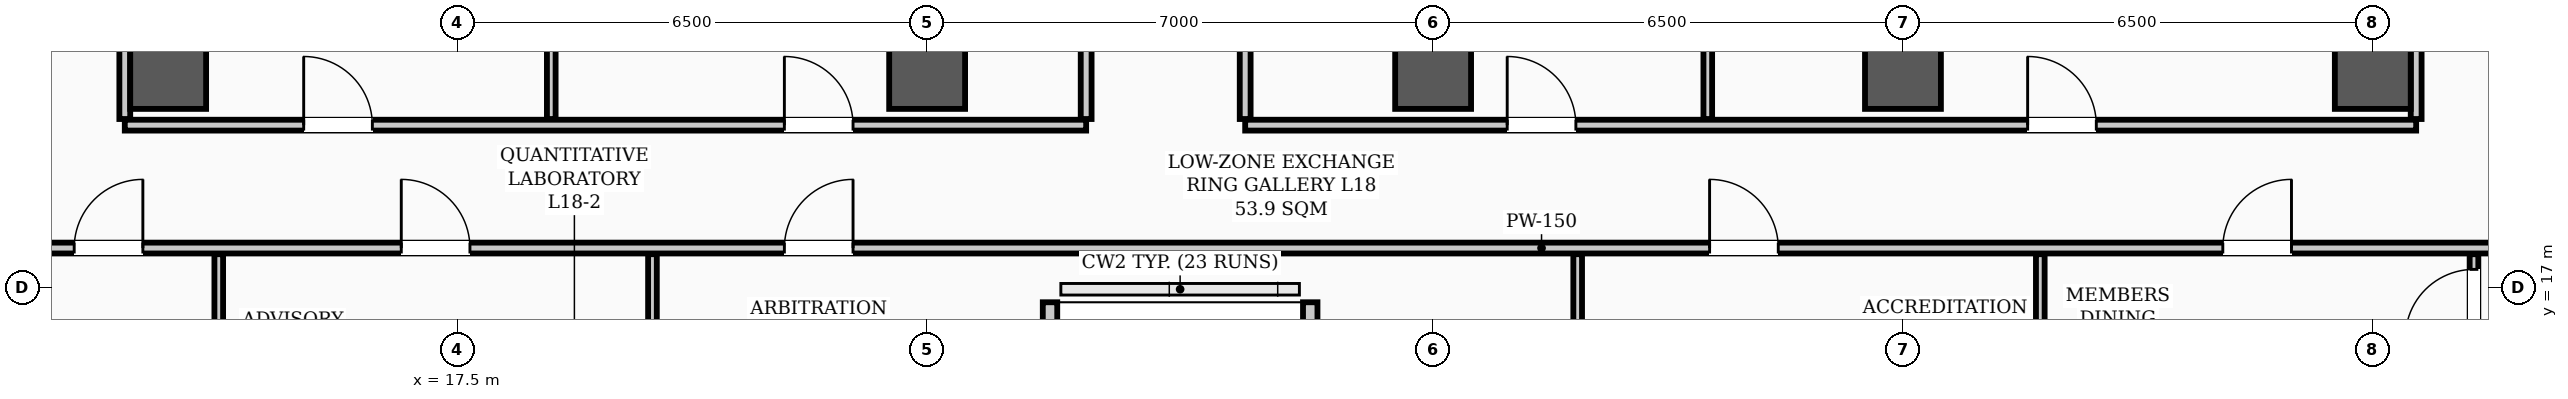
"""IFC4 building model, lengths in metres.
Left out: names, types, materials, properties, quantities, classifications, styles, units other than length and angle.
Written with IfcOpenShell. Run it as: python <this file> out.ifc"""

import sys

from ifc_helpers import new_model, si_unit, direction, frame, frame_2d, origin, origin_2d, place, context, subcontext, project, spatial, rectangle, hollow_rectangle, extrude, element, fill, save


model = new_model("IFC4")
c1 = context("Model", 3, precision=1e-05, world=origin(), true_north=direction((0.0, 1.0)))
c2 = subcontext(c1, "Body", "Model", "MODEL_VIEW")
j1 = project(units=[si_unit("LENGTHUNIT", "METRE"), si_unit("PLANEANGLEUNIT", "RADIAN")], contexts=[c1])
p1 = place(None, origin())
s1 = spatial("IfcSite", under=j1, at=p1, CompositionType="ELEMENT")
p2 = place(p1, origin())
s2 = spatial("IfcBuilding", under=s1, at=p2, CompositionType="ELEMENT")
p3 = place(p2, frame((0.0, 0.0, 73.3)))
s3 = spatial("IfcBuildingStorey", under=s2, at=p3, CompositionType="ELEMENT", Elevation=73.3)
for number, where, z_axis, x_axis in (
    (1, (13.5, 20.0, 0.0), (0.0, 0.0, 1.0), (1.0, 0.0, 0.0)),
    (2, (24.0, 20.0, 0.0), (0.0, 0.0, 1.0), (1.0, 0.0, 0.0)),
    (3, (31.0, 20.0, 0.0), (0.0, 0.0, 1.0), (1.0, 0.0, 0.0)),
    (4, (37.5, 20.0, 0.0), (0.0, 0.0, 1.0), (1.0, 0.0, 0.0)),
    (5, (44.0, 20.0, 0.0), (0.0, 0.0, 1.0), (1.0, 0.0, 0.0)),
):
    element("IfcColumn", number, at=place(p3, frame(where, z_axis=z_axis, x_axis=x_axis)), inside=s3, PredefinedType="COLUMN", context=c2, shape_type="SweptSolid", body=[
        extrude(hollow_rectangle(XDim=1.05, YDim=1.05, WallThickness=0.038, InnerFilletRadius=0.019, OuterFilletRadius=0.057, at=origin_2d()), origin(), (0.0, 0.0, 1.0), 3.9),
    ])
for number, where, z_axis, x_axis in (
    (6, (25.7, 15.1, 0.0), (0.0, 0.0, 1.0), (0.0, 1.0, 0.0)),
    (7, (29.3, 16.8, 0.0), (0.0, 0.0, 1.0), (0.0, -1.0, 0.0)),
):
    element("IfcWall", number, at=place(p3, frame(where, z_axis=z_axis, x_axis=x_axis)), inside=s3, PredefinedType="PARAPET", context=c2, shape_type="SweptSolid", body=[
        extrude(rectangle(XDim=1.7, YDim=0.2, at=frame_2d((0.85, 0.0))), origin(), (0.0, 0.0, 1.0), 1.2),
    ])
p4 = place(p3, frame((10.16, 17.55, 0.0), z_axis=(0.0, 0.0, 1.0), x_axis=(1.0, 0.0, 0.0)))
e8 = element("IfcWall", 8, at=p4, inside=s3, PredefinedType="PARTITIONING", context=c2, shape_type="SweptSolid", body=[
    extrude(rectangle(XDim=44.68, YDim=0.15, at=frame_2d((22.34, 0.0))), origin(), (0.0, 0.0, 1.0), 3.1),
])
p5 = place(p4, frame((2.04, 0.0, 0.0)))
e9 = element("IfcOpeningElement", 9, at=p5, cuts=e8, PredefinedType="OPENING", context=c2, shape_type="SweptSolid", body=[
    extrude(rectangle(XDim=0.95, YDim=2.08, at=frame_2d((0.475, 1.04))), frame((0.0, 0.085, 0.0), z_axis=(0.0, -1.0, 0.0), x_axis=(1.0, 0.0, 0.0)), (0.0, 0.0, 1.0), 0.17),
])
p6 = place(p4, frame((6.565, 0.0, 0.0)))
e10 = element("IfcOpeningElement", 10, at=p6, cuts=e8, PredefinedType="OPENING", context=c2, shape_type="SweptSolid", body=[
    extrude(rectangle(XDim=0.95, YDim=2.08, at=frame_2d((0.475, 1.04))), frame((0.0, 0.085, 0.0), z_axis=(0.0, -1.0, 0.0), x_axis=(1.0, 0.0, 0.0)), (0.0, 0.0, 1.0), 0.17),
])
p7 = place(p4, frame((11.865, 0.0, 0.0)))
e11 = element("IfcOpeningElement", 11, at=p7, cuts=e8, PredefinedType="OPENING", context=c2, shape_type="SweptSolid", body=[
    extrude(rectangle(XDim=0.95, YDim=2.08, at=frame_2d((0.475, 1.04))), frame((0.0, 0.085, 0.0), z_axis=(0.0, -1.0, 0.0), x_axis=(1.0, 0.0, 0.0)), (0.0, 0.0, 1.0), 0.17),
])
p8 = place(p4, frame((24.665, 0.0, 0.0)))
e12 = element("IfcOpeningElement", 12, at=p8, cuts=e8, PredefinedType="OPENING", context=c2, shape_type="SweptSolid", body=[
    extrude(rectangle(XDim=0.95, YDim=2.08, at=frame_2d((0.475, 1.04))), frame((0.0, 0.085, 0.0), z_axis=(0.0, -1.0, 0.0), x_axis=(1.0, 0.0, 0.0)), (0.0, 0.0, 1.0), 0.17),
])
p9 = place(p4, frame((31.765, 0.0, 0.0)))
e13 = element("IfcOpeningElement", 13, at=p9, cuts=e8, PredefinedType="OPENING", context=c2, shape_type="SweptSolid", body=[
    extrude(rectangle(XDim=0.95, YDim=2.08, at=frame_2d((0.475, 1.04))), frame((0.0, 0.085, 0.0), z_axis=(0.0, -1.0, 0.0), x_axis=(1.0, 0.0, 0.0)), (0.0, 0.0, 1.0), 0.17),
])
p10 = place(p3, frame((12.9, 19.25, 0.0), z_axis=(0.0, 0.0, 1.0), x_axis=(1.0, 0.0, 0.0)))
e14 = element("IfcWall", 14, at=p10, inside=s3, PredefinedType="PARTITIONING", context=c2, shape_type="SweptSolid", body=[
    extrude(rectangle(XDim=13.3, YDim=0.15, at=frame_2d((6.65, 0.0))), origin(), (0.0, 0.0, 1.0), 3.1),
])
p11 = place(p10, frame((2.475, 0.0, 0.0)))
e15 = element("IfcOpeningElement", 15, at=p11, cuts=e14, PredefinedType="OPENING", context=c2, shape_type="SweptSolid", body=[
    extrude(rectangle(XDim=0.95, YDim=2.08, at=frame_2d((0.475, 1.04))), frame((0.0, 0.085, 0.0), z_axis=(0.0, -1.0, 0.0), x_axis=(1.0, 0.0, 0.0)), (0.0, 0.0, 1.0), 0.17),
])
p12 = place(p10, frame((9.125, 0.0, 0.0)))
e16 = element("IfcOpeningElement", 16, at=p12, cuts=e14, PredefinedType="OPENING", context=c2, shape_type="SweptSolid", body=[
    extrude(rectangle(XDim=0.95, YDim=2.08, at=frame_2d((0.475, 1.04))), frame((0.0, 0.085, 0.0), z_axis=(0.0, -1.0, 0.0), x_axis=(1.0, 0.0, 0.0)), (0.0, 0.0, 1.0), 0.17),
])
p13 = place(p3, frame((28.4, 19.25, 0.0), z_axis=(0.0, 0.0, 1.0), x_axis=(1.0, 0.0, 0.0)))
e17 = element("IfcWall", 17, at=p13, inside=s3, PredefinedType="PARTITIONING", context=c2, shape_type="SweptSolid", body=[
    extrude(rectangle(XDim=16.2, YDim=0.15, at=frame_2d((8.1, 0.0))), origin(), (0.0, 0.0, 1.0), 3.1),
])
p14 = place(p13, frame((3.625, 0.0, 0.0)))
e18 = element("IfcOpeningElement", 18, at=p14, cuts=e17, PredefinedType="OPENING", context=c2, shape_type="SweptSolid", body=[
    extrude(rectangle(XDim=0.95, YDim=2.08, at=frame_2d((0.475, 1.04))), frame((0.0, 0.085, 0.0), z_axis=(0.0, -1.0, 0.0), x_axis=(1.0, 0.0, 0.0)), (0.0, 0.0, 1.0), 0.17),
])
p15 = place(p13, frame((10.825, 0.0, 0.0)))
e19 = element("IfcOpeningElement", 19, at=p15, cuts=e17, PredefinedType="OPENING", context=c2, shape_type="SweptSolid", body=[
    extrude(rectangle(XDim=0.95, YDim=2.08, at=frame_2d((0.475, 1.04))), frame((0.0, 0.085, 0.0), z_axis=(0.0, -1.0, 0.0), x_axis=(1.0, 0.0, 0.0)), (0.0, 0.0, 1.0), 0.17),
])
for number, where, z_axis, x_axis in (
    (20, (26.2, 19.335, 0.0), (0.0, 0.0, 1.0), (0.0, 1.0, 0.0)),
    (21, (28.4, 19.335, 0.0), (0.0, 0.0, 1.0), (0.0, 1.0, 0.0)),
    (22, (12.9, 19.335, 0.0), (0.0, 0.0, 1.0), (0.0, 1.0, 0.0)),
    (23, (44.6, 19.335, 0.0), (0.0, 0.0, 1.0), (0.0, 1.0, 0.0)),
):
    element("IfcWall", number, at=place(p3, frame(where, z_axis=z_axis, x_axis=x_axis)), inside=s3, PredefinedType="PARTITIONING", context=c2, shape_type="SweptSolid", body=[
        extrude(rectangle(XDim=7.38, YDim=0.15, at=frame_2d((3.69, 0.0))), origin(), (0.0, 0.0, 1.0), 3.0),
    ])
for number, where, z_axis, x_axis in (
    (24, (14.2, 15.31, 0.0), (0.0, 0.0, 1.0), (0.0, 1.0, 0.0)),
    (25, (20.2, 15.31, 0.0), (0.0, 0.0, 1.0), (0.0, 1.0, 0.0)),
    (26, (33.0, 15.31, 0.0), (0.0, 0.0, 1.0), (0.0, 1.0, 0.0)),
    (27, (39.4, 15.31, 0.0), (0.0, 0.0, 1.0), (0.0, 1.0, 0.0)),
):
    element("IfcWall", number, at=place(p3, frame(where, z_axis=z_axis, x_axis=x_axis)), inside=s3, PredefinedType="PARTITIONING", context=c2, shape_type="SweptSolid", body=[
        extrude(rectangle(XDim=2.155, YDim=0.12, at=frame_2d((1.078, 0.0))), origin(), (0.0, 0.0, 1.0), 3.212),
    ])
p16 = place(p3, frame((45.4, 15.31, 0.0), z_axis=(0.0, 0.0, 1.0), x_axis=(0.0, 1.0, 0.0)))
e28 = element("IfcWall", 28, at=p16, inside=s3, PredefinedType="PARTITIONING", context=c2, shape_type="SweptSolid", body=[
    extrude(rectangle(XDim=2.155, YDim=0.12, at=frame_2d((1.078, 0.0))), origin(), (0.0, 0.0, 1.0), 3.72),
])
p17 = place(p16, frame((0.995, 0.0, 0.0)))
e29 = element("IfcOpeningElement", 29, at=p17, cuts=e28, PredefinedType="OPENING", context=c2, shape_type="SweptSolid", body=[
    extrude(rectangle(XDim=0.95, YDim=2.08, at=frame_2d((0.475, 1.04))), frame((0.0, 0.07, 0.0), z_axis=(0.0, -1.0, 0.0), x_axis=(1.0, 0.0, 0.0)), (0.0, 0.0, 1.0), 0.14),
])
for number, where, z_axis, x_axis in (
    (30, (18.8, 19.335, 0.0), (0.0, 0.0, 1.0), (0.0, 1.0, 0.0)),
    (31, (34.8, 19.335, 0.0), (0.0, 0.0, 1.0), (0.0, 1.0, 0.0)),
):
    element("IfcWall", number, at=place(p3, frame(where, z_axis=z_axis, x_axis=x_axis)), inside=s3, PredefinedType="PARTITIONING", context=c2, shape_type="SweptSolid", body=[
        extrude(rectangle(XDim=7.38, YDim=0.12, at=frame_2d((3.69, 0.0))), origin(), (0.0, 0.0, 1.0), 3.0),
    ])
p18 = place(p5, origin())
e32 = element("IfcDoor", 32, at=p18, inside=s3, OperationType="SINGLE_SWING_RIGHT", PredefinedType="DOOR", context=c2, shape_type="SweptSolid", body=[
    extrude(rectangle(XDim=0.95, YDim=2.08, at=frame_2d((0.475, 1.04))), frame((0.0, 0.025, 0.0), z_axis=(0.0, -1.0, 0.0), x_axis=(1.0, 0.0, 0.0)), (0.0, 0.0, 1.0), 0.05),
])
fill(e9, e32)
p19 = place(p6, origin())
e33 = element("IfcDoor", 33, at=p19, inside=s3, OperationType="SINGLE_SWING_LEFT", PredefinedType="DOOR", context=c2, shape_type="SweptSolid", body=[
    extrude(rectangle(XDim=0.95, YDim=2.08, at=frame_2d((0.475, 1.04))), frame((0.0, 0.025, 0.0), z_axis=(0.0, -1.0, 0.0), x_axis=(1.0, 0.0, 0.0)), (0.0, 0.0, 1.0), 0.05),
])
fill(e10, e33)
p20 = place(p7, origin())
e34 = element("IfcDoor", 34, at=p20, inside=s3, OperationType="SINGLE_SWING_RIGHT", PredefinedType="DOOR", context=c2, shape_type="SweptSolid", body=[
    extrude(rectangle(XDim=0.95, YDim=2.08, at=frame_2d((0.475, 1.04))), frame((0.0, 0.025, 0.0), z_axis=(0.0, -1.0, 0.0), x_axis=(1.0, 0.0, 0.0)), (0.0, 0.0, 1.0), 0.05),
])
fill(e11, e34)
p21 = place(p8, origin())
e35 = element("IfcDoor", 35, at=p21, inside=s3, OperationType="SINGLE_SWING_LEFT", PredefinedType="DOOR", context=c2, shape_type="SweptSolid", body=[
    extrude(rectangle(XDim=0.95, YDim=2.08, at=frame_2d((0.475, 1.04))), frame((0.0, 0.025, 0.0), z_axis=(0.0, -1.0, 0.0), x_axis=(1.0, 0.0, 0.0)), (0.0, 0.0, 1.0), 0.05),
])
fill(e12, e35)
p22 = place(p9, origin())
e36 = element("IfcDoor", 36, at=p22, inside=s3, OperationType="SINGLE_SWING_RIGHT", PredefinedType="DOOR", context=c2, shape_type="SweptSolid", body=[
    extrude(rectangle(XDim=0.95, YDim=2.08, at=frame_2d((0.475, 1.04))), frame((0.0, 0.025, 0.0), z_axis=(0.0, -1.0, 0.0), x_axis=(1.0, 0.0, 0.0)), (0.0, 0.0, 1.0), 0.05),
])
fill(e13, e36)
p23 = place(p17, origin())
e37 = element("IfcDoor", 37, at=p23, inside=s3, OperationType="SINGLE_SWING_LEFT", PredefinedType="DOOR", context=c2, shape_type="SweptSolid", body=[
    extrude(rectangle(XDim=0.95, YDim=2.08, at=frame_2d((0.475, 1.04))), frame((0.0, 0.025, 0.0), z_axis=(0.0, -1.0, 0.0), x_axis=(1.0, 0.0, 0.0)), (0.0, 0.0, 1.0), 0.05),
])
fill(e29, e37)
p24 = place(p11, origin())
e38 = element("IfcDoor", 38, at=p24, inside=s3, OperationType="SINGLE_SWING_LEFT", PredefinedType="DOOR", context=c2, shape_type="SweptSolid", body=[
    extrude(rectangle(XDim=0.95, YDim=2.08, at=frame_2d((0.475, 1.04))), frame((0.0, 0.025, 0.0), z_axis=(0.0, -1.0, 0.0), x_axis=(1.0, 0.0, 0.0)), (0.0, 0.0, 1.0), 0.05),
])
fill(e15, e38)
p25 = place(p12, origin())
e39 = element("IfcDoor", 39, at=p25, inside=s3, OperationType="SINGLE_SWING_LEFT", PredefinedType="DOOR", context=c2, shape_type="SweptSolid", body=[
    extrude(rectangle(XDim=0.95, YDim=2.08, at=frame_2d((0.475, 1.04))), frame((0.0, 0.025, 0.0), z_axis=(0.0, -1.0, 0.0), x_axis=(1.0, 0.0, 0.0)), (0.0, 0.0, 1.0), 0.05),
])
fill(e16, e39)
p26 = place(p14, origin())
e40 = element("IfcDoor", 40, at=p26, inside=s3, OperationType="SINGLE_SWING_LEFT", PredefinedType="DOOR", context=c2, shape_type="SweptSolid", body=[
    extrude(rectangle(XDim=0.95, YDim=2.08, at=frame_2d((0.475, 1.04))), frame((0.0, 0.025, 0.0), z_axis=(0.0, -1.0, 0.0), x_axis=(1.0, 0.0, 0.0)), (0.0, 0.0, 1.0), 0.05),
])
fill(e18, e40)
p27 = place(p15, origin())
e41 = element("IfcDoor", 41, at=p27, inside=s3, OperationType="SINGLE_SWING_LEFT", PredefinedType="DOOR", context=c2, shape_type="SweptSolid", body=[
    extrude(rectangle(XDim=0.95, YDim=2.08, at=frame_2d((0.475, 1.04))), frame((0.0, 0.025, 0.0), z_axis=(0.0, -1.0, 0.0), x_axis=(1.0, 0.0, 0.0)), (0.0, 0.0, 1.0), 0.05),
])
fill(e19, e41)
save(model, sys.argv[1])
